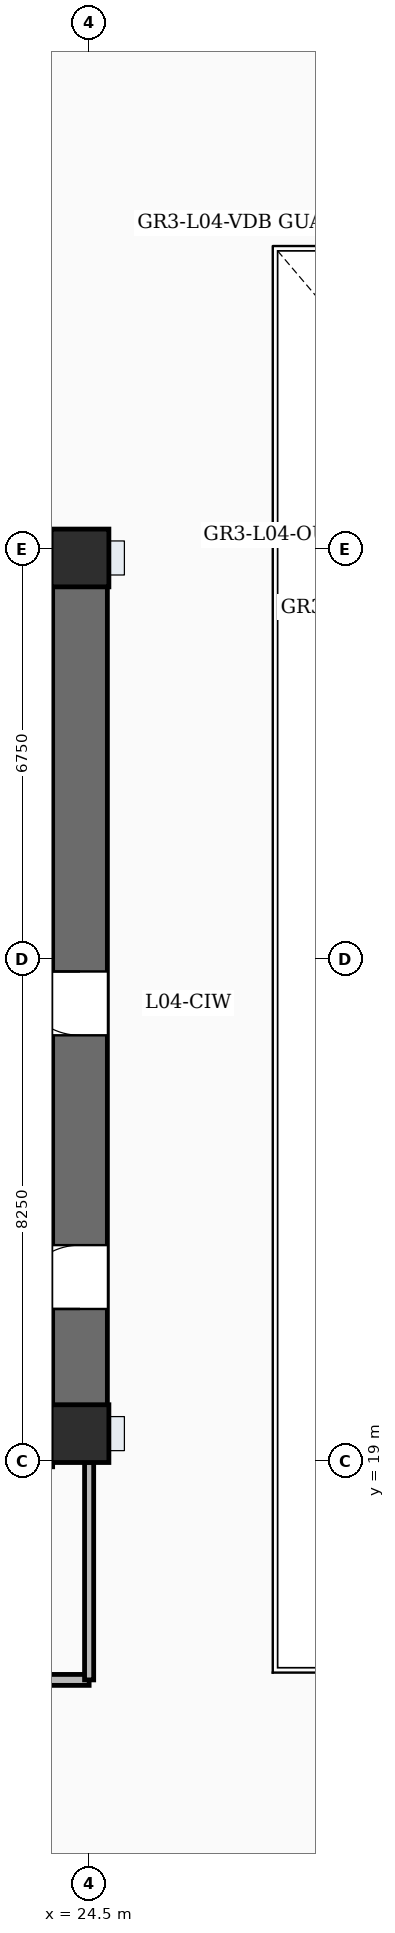
"""IFC4 building model, lengths in metres.
Left out: names, types, materials, properties, quantities, classifications, styles, units other than length and angle.
Written with IfcOpenShell. Run it as: python <this file> out.ifc"""

import sys

from ifc_helpers import new_model, si_unit, direction, frame, frame_2d, origin, origin_2d, place, context, subcontext, project, spatial, rectangle, extrude, element, fill, save


model = new_model("IFC4")
c1 = context("Model", 3, precision=1e-05, world=origin(), true_north=direction((0.0, 1.0)))
c2 = subcontext(c1, "Body", "Model", "MODEL_VIEW")
j1 = project(units=[si_unit("LENGTHUNIT", "METRE"), si_unit("PLANEANGLEUNIT", "RADIAN")], contexts=[c1])
p1 = place(None, origin())
s1 = spatial("IfcSite", under=j1, at=p1, CompositionType="ELEMENT")
p2 = place(p1, origin())
s2 = spatial("IfcBuilding", under=s1, at=p2, CompositionType="ELEMENT")
p3 = place(p2, frame((0.0, 0.0, 23.0)))
s3 = spatial("IfcBuildingStorey", under=s2, at=p3, CompositionType="ELEMENT", Elevation=23.0)
p4 = place(p3, frame((24.35, 19.0, -0.35), z_axis=(0.0, 0.0, 1.0), x_axis=(0.0, 1.0, 0.0)))
e1 = element("IfcWall", 1, at=p4, inside=s3, PredefinedType="SHEAR", context=c2, shape_type="SweptSolid", body=[
    extrude(rectangle(XDim=15.3, YDim=0.9, at=frame_2d((7.65, 0.0))), origin(), (0.0, 0.0, 1.0), 5.0),
])
p5 = place(p4, frame((2.5, 0.0, 0.35)))
e2 = element("IfcOpeningElement", 2, at=p5, cuts=e1, PredefinedType="OPENING", context=c2, shape_type="SweptSolid", body=[
    extrude(rectangle(XDim=1.05, YDim=2.15, at=frame_2d((0.525, 1.075))), frame((0.0, 0.46, 0.0), z_axis=(0.0, -1.0, 0.0), x_axis=(1.0, 0.0, 0.0)), (0.0, 0.0, 1.0), 0.92),
])
p6 = place(p4, frame((7.0, 0.0, 0.35)))
e3 = element("IfcOpeningElement", 3, at=p6, cuts=e1, PredefinedType="OPENING", context=c2, shape_type="SweptSolid", body=[
    extrude(rectangle(XDim=1.05, YDim=2.15, at=frame_2d((0.525, 1.075))), frame((0.0, 0.46, 0.0), z_axis=(0.0, -1.0, 0.0), x_axis=(1.0, 0.0, 0.0)), (0.0, 0.0, 1.0), 0.92),
])
for number, where, z_axis, x_axis in (
    (4, (15.0, 19.45, -0.35), (0.0, 0.0, 1.0), (1.0, 0.0, 0.0)),
    (5, (15.0, 33.85, -0.35), (0.0, 0.0, 1.0), (1.0, 0.0, 0.0)),
):
    element("IfcWall", number, at=place(p3, frame(where, z_axis=z_axis, x_axis=x_axis)), inside=s3, PredefinedType="SHEAR", context=c2, shape_type="SweptSolid", body=[
        extrude(rectangle(XDim=8.9, YDim=0.9, at=frame_2d((4.45, 0.0))), origin(), (0.0, 0.0, 1.0), 5.0),
    ])
for number, where, z_axis, x_axis in (
    (6, (24.35, 19.45, -0.35), (0.0, 0.0, 1.0), (1.0, 0.0, 0.0)),
    (7, (24.35, 33.85, -0.35), (0.0, 0.0, 1.0), (1.0, 0.0, 0.0)),
):
    element("IfcColumn", number, at=place(p3, frame(where, z_axis=z_axis, x_axis=x_axis)), inside=s3, PredefinedType="COLUMN", context=c2, shape_type="SweptSolid", body=[
        extrude(rectangle(XDim=0.95, YDim=0.95, at=origin_2d()), origin(), (0.0, 0.0, 1.0), 5.0),
    ])
p7 = place(p3, frame((23.9, 28.78, 0.0), z_axis=(0.0, 0.0, 1.0), x_axis=(-1.0, 0.0, 0.0)))
e8 = element("IfcWall", 8, at=p7, inside=s3, PredefinedType="SOLIDWALL", context=c2, shape_type="SweptSolid", body=[
    extrude(rectangle(XDim=8.9, YDim=0.24, at=frame_2d((4.45, 0.0))), origin(), (0.0, 0.0, 1.0), 4.65),
])
p8 = place(p7, frame((7.38, 0.0, 0.0)))
e9 = element("IfcOpeningElement", 9, at=p8, cuts=e8, PredefinedType="OPENING", context=c2, shape_type="SweptSolid", body=[
    extrude(rectangle(XDim=1.1, YDim=2.15, at=frame_2d((0.55, 1.075))), frame((0.0, 0.13, 0.0), z_axis=(0.0, -1.0, 0.0), x_axis=(1.0, 0.0, 0.0)), (0.0, 0.0, 1.0), 0.26),
])
p9 = place(p3, frame((15.0, 32.25, 0.0), z_axis=(0.0, 0.0, 1.0), x_axis=(1.0, 0.0, 0.0)))
e10 = element("IfcWall", 10, at=p9, inside=s3, PredefinedType="SOLIDWALL", context=c2, shape_type="SweptSolid", body=[
    extrude(rectangle(XDim=8.9, YDim=0.24, at=frame_2d((4.45, 0.0))), origin(), (0.0, 0.0, 1.0), 4.65),
])
p10 = place(p3, frame((23.78, 28.9, 0.0), z_axis=(0.0, 0.0, 1.0), x_axis=(0.0, 1.0, 0.0)))
e11 = element("IfcWall", 11, at=p10, inside=s3, PredefinedType="SOLIDWALL", context=c2, shape_type="SweptSolid", body=[
    extrude(rectangle(XDim=3.23, YDim=0.24, at=frame_2d((1.615, 0.0))), origin(), (0.0, 0.0, 1.0), 4.65),
])
for number, where, z_axis, x_axis in (
    (12, (20.9, 20.905, 0.0), (0.0, 0.0, 1.0), (1.0, 0.0, 0.0)),
    (13, (20.9, 18.995, 0.0), (0.0, 0.0, 1.0), (1.0, 0.0, 0.0)),
):
    element("IfcWall", number, at=place(p3, frame(where, z_axis=z_axis, x_axis=x_axis)), inside=s3, PredefinedType="SOLIDWALL", context=c2, shape_type="SweptSolid", body=[
        extrude(rectangle(XDim=3.0, YDim=0.18, at=frame_2d((1.5, 0.0))), origin(), (0.0, 0.0, 1.0), 4.65),
    ])
for number, where, z_axis, x_axis in (
    (14, (20.95, 25.155, 0.0), (0.0, 0.0, 1.0), (1.0, 0.0, 0.0)),
    (15, (20.95, 23.045, 0.0), (0.0, 0.0, 1.0), (1.0, 0.0, 0.0)),
):
    element("IfcWall", number, at=place(p3, frame(where, z_axis=z_axis, x_axis=x_axis)), inside=s3, PredefinedType="SOLIDWALL", context=c2, shape_type="SweptSolid", body=[
        extrude(rectangle(XDim=2.95, YDim=0.18, at=frame_2d((1.475, 0.0))), origin(), (0.0, 0.0, 1.0), 4.65),
    ])
p11 = place(p3, frame((14.6, 15.4, 0.0), z_axis=(0.0, 0.0, 1.0), x_axis=(1.0, 0.0, 0.0)))
e16 = element("IfcWall", 16, at=p11, inside=s3, PredefinedType="PARTITIONING", context=c2, shape_type="SweptSolid", body=[
    extrude(rectangle(XDim=9.9, YDim=0.18, at=frame_2d((4.95, 0.0))), origin(), (0.0, 0.0, 1.0), 3.71),
])
p12 = place(p11, frame((1.99, 0.0, 0.0)))
e17 = element("IfcOpeningElement", 17, at=p12, cuts=e16, PredefinedType="OPENING", context=c2, shape_type="SweptSolid", body=[
    extrude(rectangle(XDim=0.92, YDim=2.1, at=frame_2d((0.46, 1.05))), frame((0.0, 0.1, 0.0), z_axis=(0.0, -1.0, 0.0), x_axis=(1.0, 0.0, 0.0)), (0.0, 0.0, 1.0), 0.2),
])
p13 = place(p11, frame((6.94, 0.0, 0.0)))
e18 = element("IfcOpeningElement", 18, at=p13, cuts=e16, PredefinedType="OPENING", context=c2, shape_type="SweptSolid", body=[
    extrude(rectangle(XDim=0.92, YDim=2.1, at=frame_2d((0.46, 1.05))), frame((0.0, 0.1, 0.0), z_axis=(0.0, -1.0, 0.0), x_axis=(1.0, 0.0, 0.0)), (0.0, 0.0, 1.0), 0.2),
])
p14 = place(p3, frame((24.5, 15.4, 0.0), z_axis=(0.0, 0.0, 1.0), x_axis=(0.0, 1.0, 0.0)))
e19 = element("IfcWall", 19, at=p14, inside=s3, PredefinedType="PARTITIONING", context=c2, shape_type="SweptSolid", body=[
    extrude(rectangle(XDim=3.58, YDim=0.15, at=frame_2d((1.79, 0.0))), origin(), (0.0, 0.0, 1.0), 3.71),
])
p15 = place(p5, origin())
e20 = element("IfcDoor", 20, at=p15, inside=s3, OperationType="SINGLE_SWING_LEFT", PredefinedType="DOOR", context=c2, shape_type="SweptSolid", body=[
    extrude(rectangle(XDim=1.05, YDim=2.15, at=frame_2d((0.525, 1.075))), frame((0.0, 0.025, 0.0), z_axis=(0.0, -1.0, 0.0), x_axis=(1.0, 0.0, 0.0)), (0.0, 0.0, 1.0), 0.05),
])
fill(e2, e20)
p16 = place(p6, origin())
e21 = element("IfcDoor", 21, at=p16, inside=s3, OperationType="SINGLE_SWING_RIGHT", PredefinedType="DOOR", context=c2, shape_type="SweptSolid", body=[
    extrude(rectangle(XDim=1.05, YDim=2.15, at=frame_2d((0.525, 1.075))), frame((0.0, 0.025, 0.0), z_axis=(0.0, -1.0, 0.0), x_axis=(1.0, 0.0, 0.0)), (0.0, 0.0, 1.0), 0.05),
])
fill(e3, e21)
save(model, sys.argv[1])
